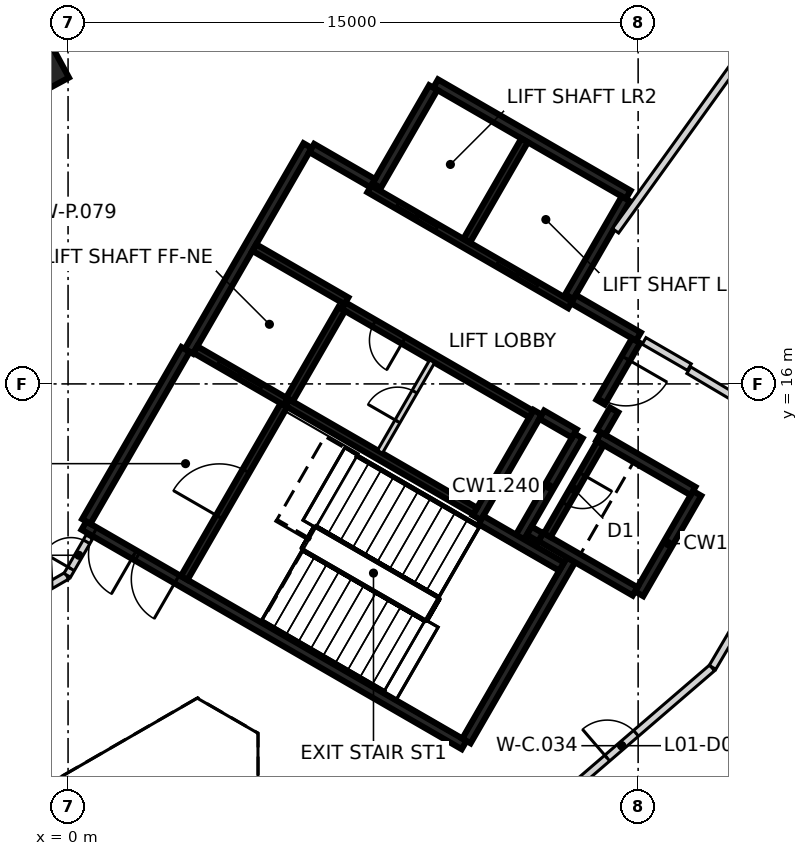
"""IFC4 building model, lengths in metres.
Left out: names, types, materials, properties, quantities, classifications, styles, units other than length and angle.
Written with IfcOpenShell. Run it as: python <this file> out.ifc"""

import sys

from ifc_helpers import new_model, si_unit, direction, frame, frame_2d, origin, origin_2d, place, context, subcontext, project, spatial, rectangle, extrude, element, fill, save


model = new_model("IFC4")
c1 = context("Model", 3, precision=1e-05, world=origin(), true_north=direction((0.0, 1.0)))
c2 = subcontext(c1, "Body", "Model", "MODEL_VIEW")
j1 = project(units=[si_unit("LENGTHUNIT", "METRE"), si_unit("PLANEANGLEUNIT", "RADIAN")], contexts=[c1])
p1 = place(None, origin())
s1 = spatial("IfcSite", under=j1, at=p1, CompositionType="ELEMENT")
p2 = place(p1, origin())
s2 = spatial("IfcBuilding", under=s1, at=p2, CompositionType="ELEMENT")
p3 = place(p2, frame((0.0, 0.0, 7.5)))
s3 = spatial("IfcBuildingStorey", under=s2, at=p3, CompositionType="ELEMENT", Elevation=7.5)
p4 = place(p3, frame((-1.197, 24.423, -0.4), z_axis=(0.0, 0.0, 1.0), x_axis=(-0.476198301069, 0.879337920289, 0.0)))
e1 = element("IfcColumn", 1, at=p4, inside=s3, PredefinedType="COLUMN", context=c2, shape_type="SweptSolid", body=[
    extrude(rectangle(XDim=1.8, YDim=1.8, at=origin_2d()), origin(), (0.0, 0.0, 1.0), 4.15),
])
p5 = place(p3, frame((10.42, 6.498, 0.0), z_axis=(0.0, 0.0, 1.0), x_axis=(-0.866021906294, 0.500006057782, 0.0)))
e2 = element("IfcWall", 2, at=p5, inside=s3, PredefinedType="SHEAR", context=c2, shape_type="SweptSolid", body=[
    extrude(rectangle(XDim=11.55, YDim=0.25, at=frame_2d((5.775, 0.0))), origin(), (0.0, 0.0, 1.0), 6.15),
])
p6 = place(p5, frame((10.025, 0.0, 0.0)))
e3 = element("IfcOpeningElement", 3, at=p6, cuts=e2, PredefinedType="OPENING", context=c2, shape_type="SweptSolid", body=[
    extrude(rectangle(XDim=1.2, YDim=2.1, at=frame_2d((0.6, 1.05))), frame((0.0, 0.135, 0.0), z_axis=(0.0, -1.0, 0.0), x_axis=(1.0, 0.0, 0.0)), (0.0, 0.0, 1.0), 0.27),
])
p7 = place(p5, frame((8.725, 0.0, 0.0)))
e4 = element("IfcOpeningElement", 4, at=p7, cuts=e2, PredefinedType="OPENING", context=c2, shape_type="SweptSolid", body=[
    extrude(rectangle(XDim=1.2, YDim=2.1, at=frame_2d((0.6, 1.05))), frame((0.0, 0.135, 0.0), z_axis=(0.0, -1.0, 0.0), x_axis=(1.0, 0.0, 0.0)), (0.0, 0.0, 1.0), 0.27),
])
p8 = place(p3, frame((3.179, 16.856, 0.0), z_axis=(0.0, 0.0, 1.0), x_axis=(0.500004234368, 0.866022959057, 0.0)))
e5 = element("IfcWall", 5, at=p8, inside=s3, PredefinedType="SHEAR", context=c2, shape_type="SweptSolid", body=[
    extrude(rectangle(XDim=6.25, YDim=0.25, at=frame_2d((3.125, 0.0))), origin(), (0.0, 0.0, 1.0), 6.15),
])
p9 = place(p3, frame((9.673, 23.903, 0.0), z_axis=(0.0, 0.0, 1.0), x_axis=(0.86603616409, -0.499981362141, 0.0)))
e6 = element("IfcWall", 6, at=p9, inside=s3, PredefinedType="SHEAR", context=c2, shape_type="SweptSolid", body=[
    extrude(rectangle(XDim=5.85, YDim=0.25, at=frame_2d((2.925, 0.0))), origin(), (0.0, 0.0, 1.0), 6.15),
])
p10 = place(p3, frame((0.48, 12.381, 0.0), z_axis=(0.0, 0.0, 1.0), x_axis=(0.49999885962, 0.866026062182, 0.0)))
e7 = element("IfcWall", 7, at=p10, inside=s3, PredefinedType="SHEAR", context=c2, shape_type="SweptSolid", body=[
    extrude(rectangle(XDim=5.225, YDim=0.25, at=frame_2d((2.612, 0.0))), origin(), (0.0, 0.0, 1.0), 6.15),
])
p11 = place(p3, frame((13.238, 11.378, 0.0), z_axis=(0.0, 0.0, 1.0), x_axis=(-0.500008851346, -0.866020293397, 0.0)))
e8 = element("IfcWall", 8, at=p11, inside=s3, PredefinedType="SHEAR", context=c2, shape_type="SweptSolid", body=[
    extrude(rectangle(XDim=5.51, YDim=0.25, at=frame_2d((2.755, 0.0))), origin(), (0.0, 0.0, 1.0), 6.15),
])
p12 = place(p3, frame((12.357, 15.252, 0.0), z_axis=(0.0, 0.0, 1.0), x_axis=(-0.500028443584, -0.866008981251, 0.0)))
e9 = element("IfcWall", 9, at=p12, inside=s3, PredefinedType="SHEAR", context=c2, shape_type="SweptSolid", body=[
    extrude(rectangle(XDim=3.2, YDim=0.25, at=frame_2d((1.6, 0.0))), origin(), (0.0, 0.0, 1.0), 6.15),
])
for number, where, z_axis, x_axis in (
    (10, (8.123, 21.219, 0.0), (0.0, 0.0, 1.0), (0.5, 0.866, 0.0)),
    (11, (14.676, 20.87, 0.0), (0.0, 0.0, 1.0), (-0.5, -0.866, 0.0)),
):
    element("IfcWall", number, at=place(p3, frame(where, z_axis=z_axis, x_axis=x_axis)), inside=s3, PredefinedType="SHEAR", context=c2, shape_type="SweptSolid", body=[
        extrude(rectangle(XDim=2.975, YDim=0.25, at=frame_2d((1.487, 0.0))), origin(), (0.0, 0.0, 1.0), 6.15),
    ])
p13 = place(p3, frame((16.552, 13.119, 0.0), z_axis=(0.0, 0.0, 1.0), x_axis=(-0.499978833458, -0.866037623948, 0.0)))
e12 = element("IfcWall", 12, at=p13, inside=s3, PredefinedType="SHEAR", context=c2, shape_type="SweptSolid", body=[
    extrude(rectangle(XDim=3.05, YDim=0.25, at=frame_2d((1.525, 0.0))), origin(), (0.0, 0.0, 1.0), 6.15),
])
p14 = place(p3, frame((14.918, 10.54, 0.0), z_axis=(0.0, 0.0, 1.0), x_axis=(-0.866063538972, 0.499933942099, 0.0)))
e13 = element("IfcWall", 13, at=p14, inside=s3, PredefinedType="SHEAR", context=c2, shape_type="SweptSolid", body=[
    extrude(rectangle(XDim=2.865, YDim=0.25, at=frame_2d((1.432, 0.0))), origin(), (0.0, 0.0, 1.0), 6.15),
])
p15 = place(p3, frame((13.963, 14.614, 0.0), z_axis=(0.0, 0.0, 1.0), x_axis=(0.866042235819, -0.499970844928, 0.0)))
e14 = element("IfcWall", 14, at=p15, inside=s3, PredefinedType="SHEAR", context=c2, shape_type="SweptSolid", body=[
    extrude(rectangle(XDim=2.865, YDim=0.25, at=frame_2d((1.432, 0.0))), origin(), (0.0, 0.0, 1.0), 6.15),
])
p16 = place(p3, frame((11.888, 11.961, 0.0), z_axis=(0.0, 0.0, 1.0), x_axis=(0.500003324108, 0.866023484601, 0.0)))
e15 = element("IfcWall", 15, at=p16, inside=s3, PredefinedType="SHEAR", context=c2, shape_type="SweptSolid", body=[
    extrude(rectangle(XDim=3.085, YDim=0.25, at=frame_2d((1.542, 0.0))), origin(), (0.0, 0.0, 1.0), 6.15),
])
p17 = place(p3, frame((10.865, 12.418, 0.0), z_axis=(0.0, 0.0, 1.0), x_axis=(0.866026229868, -0.499998569178, 0.0)))
e16 = element("IfcWall", 16, at=p17, inside=s3, PredefinedType="SHEAR", context=c2, shape_type="SweptSolid", body=[
    extrude(rectangle(XDim=2.449, YDim=0.25, at=frame_2d((1.225, 0.0))), origin(), (0.0, 0.0, 1.0), 6.15),
])
p18 = place(p3, frame((13.297, 18.231, 0.0), z_axis=(0.0, 0.0, 1.0), x_axis=(0.866043531843, -0.499968599967, 0.0)))
e17 = element("IfcWall", 17, at=p18, inside=s3, PredefinedType="SHEAR", context=c2, shape_type="SweptSolid", body=[
    extrude(rectangle(XDim=1.975, YDim=0.25, at=frame_2d((0.987, 0.0))), origin(), (0.0, 0.0, 1.0), 6.15),
])
p19 = place(p3, frame((6.413, 22.206, 0.0), z_axis=(0.0, 0.0, 1.0), x_axis=(0.866016279763, -0.500015802937, 0.0)))
e18 = element("IfcWall", 18, at=p19, inside=s3, PredefinedType="SHEAR", context=c2, shape_type="SweptSolid", body=[
    extrude(rectangle(XDim=1.849, YDim=0.25, at=frame_2d((0.925, 0.0))), origin(), (0.0, 0.0, 1.0), 6.15),
])
p20 = place(p3, frame((14.945, 17.135, 0.0), z_axis=(0.0, 0.0, 1.0), x_axis=(-0.499983108224, -0.866035156036, 0.0)))
e19 = element("IfcWall", 19, at=p20, inside=s3, PredefinedType="SHEAR", context=c2, shape_type="SweptSolid", body=[
    extrude(rectangle(XDim=1.865, YDim=0.25, at=frame_2d((0.932, 0.0))), origin(), (0.0, 0.0, 1.0), 6.15),
])
p21 = place(p20, frame((0.535, 0.0, 0.0)))
e20 = element("IfcOpeningElement", 20, at=p21, cuts=e19, PredefinedType="OPENING", context=c2, shape_type="SweptSolid", body=[
    extrude(rectangle(XDim=1.25, YDim=2.1, at=frame_2d((0.625, 1.05))), frame((0.0, 0.135, 0.0), z_axis=(0.0, -1.0, 0.0), x_axis=(1.0, 0.0, 0.0)), (0.0, 0.0, 1.0), 0.27),
])
p22 = place(p3, frame((13.322, 14.695, 0.0), z_axis=(0.0, 0.0, 1.0), x_axis=(-0.866017078145, 0.500014420154, 0.0)))
e21 = element("IfcWall", 21, at=p22, inside=s3, PredefinedType="SHEAR", context=c2, shape_type="SweptSolid", body=[
    extrude(rectangle(XDim=0.989, YDim=0.25, at=frame_2d((0.495, 0.0))), origin(), (0.0, 0.0, 1.0), 6.15),
])
p23 = place(p3, frame((14.368, 15.315, 0.0), z_axis=(0.0, 0.0, 1.0), x_axis=(-0.499897359611, -0.866084655132, 0.0)))
e22 = element("IfcWall", 22, at=p23, inside=s3, PredefinedType="SHEAR", context=c2, shape_type="SweptSolid", body=[
    extrude(rectangle(XDim=0.685, YDim=0.25, at=frame_2d((0.342, 0.0))), origin(), (0.0, 0.0, 1.0), 6.15),
])
p24 = place(p3, frame((12.433, 11.964, 0.0), z_axis=(0.0, 0.0, 1.0), x_axis=(-0.866055875208, 0.499947218231, 0.0)))
e23 = element("IfcWall", 23, at=p24, inside=s3, PredefinedType="SHEAR", context=c2, shape_type="SweptSolid", body=[
    extrude(rectangle(XDim=0.345, YDim=0.25, at=frame_2d((0.172, 0.0))), origin(), (0.0, 0.0, 1.0), 6.15),
])
p25 = place(p3, frame((13.21, 18.08, 0.0), z_axis=(0.0, 0.0, 1.0), x_axis=(-0.866030299012, 0.499991521122, 0.0)))
e24 = element("IfcWall", 24, at=p25, inside=s3, PredefinedType="SHEAR", context=c2, shape_type="SweptSolid", body=[
    extrude(rectangle(XDim=6.1, YDim=0.2, at=frame_2d((3.05, 0.0))), origin(), (0.0, 0.0, 1.0), 6.15),
])
p26 = place(p25, frame((1.0, 0.0, 0.0)))
e25 = element("IfcOpeningElement", 25, at=p26, cuts=e24, PredefinedType="OPENING", context=c2, shape_type="SweptSolid", body=[
    extrude(rectangle(XDim=1.2, YDim=2.1, at=frame_2d((0.6, 1.05))), frame((0.0, 0.11, 0.0), z_axis=(0.0, -1.0, 0.0), x_axis=(1.0, 0.0, 0.0)), (0.0, 0.0, 1.0), 0.22),
])
p27 = place(p25, frame((4.05, 0.0, 0.0)))
e26 = element("IfcOpeningElement", 26, at=p27, cuts=e24, PredefinedType="OPENING", context=c2, shape_type="SweptSolid", body=[
    extrude(rectangle(XDim=1.2, YDim=2.1, at=frame_2d((0.6, 1.05))), frame((0.0, 0.11, 0.0), z_axis=(0.0, -1.0, 0.0), x_axis=(1.0, 0.0, 0.0)), (0.0, 0.0, 1.0), 0.22),
])
p28 = place(p3, frame((5.775, 15.502, 0.0), z_axis=(0.0, 0.0, 1.0), x_axis=(0.866020080793, -0.500009219579, 0.0)))
e27 = element("IfcWall", 27, at=p28, inside=s3, PredefinedType="SHEAR", context=c2, shape_type="SweptSolid", body=[
    extrude(rectangle(XDim=5.699, YDim=0.2, at=frame_2d((2.85, 0.0))), origin(), (0.0, 0.0, 1.0), 6.15),
])
p29 = place(p3, frame((12.185, 15.207, 0.0), z_axis=(0.0, 0.0, 1.0), x_axis=(-0.866020080793, 0.500009219579, 0.0)))
e28 = element("IfcWall", 28, at=p29, inside=s3, PredefinedType="SHEAR", context=c2, shape_type="SweptSolid", body=[
    extrude(rectangle(XDim=5.699, YDim=0.2, at=frame_2d((2.85, 0.0))), origin(), (0.0, 0.0, 1.0), 6.15),
])
p30 = place(p29, frame((3.874, 0.0, 0.0)))
e29 = element("IfcOpeningElement", 29, at=p30, cuts=e28, PredefinedType="OPENING", context=c2, shape_type="SweptSolid", body=[
    extrude(rectangle(XDim=0.9, YDim=2.1, at=frame_2d((0.45, 1.05))), frame((0.0, 0.11, 0.0), z_axis=(0.0, -1.0, 0.0), x_axis=(1.0, 0.0, 0.0)), (0.0, 0.0, 1.0), 0.22),
])
p31 = place(p3, frame((3.057, 10.895, 0.0), z_axis=(0.0, 0.0, 1.0), x_axis=(0.499989418164, 0.866031513124, 0.0)))
e30 = element("IfcWall", 30, at=p31, inside=s3, PredefinedType="SHEAR", context=c2, shape_type="SweptSolid", body=[
    extrude(rectangle(XDim=5.251, YDim=0.2, at=frame_2d((2.625, 0.0))), origin(), (0.0, 0.0, 1.0), 6.15),
])
p32 = place(p31, frame((1.849, 0.0, 0.0)))
e31 = element("IfcOpeningElement", 31, at=p32, cuts=e30, PredefinedType="OPENING", context=c2, shape_type="SweptSolid", body=[
    extrude(rectangle(XDim=1.4, YDim=2.1, at=frame_2d((0.7, 1.05))), frame((0.0, 0.11, 0.0), z_axis=(0.0, -1.0, 0.0), x_axis=(1.0, 0.0, 0.0)), (0.0, 0.0, 1.0), 0.22),
])
p33 = place(p3, frame((10.489, 19.767, 0.0), z_axis=(0.0, 0.0, 1.0), x_axis=(0.499946628782, 0.866056215479, 0.0)))
e32 = element("IfcWall", 32, at=p33, inside=s3, PredefinedType="SHEAR", context=c2, shape_type="SweptSolid", body=[
    extrude(rectangle(XDim=3.048, YDim=0.2, at=frame_2d((1.524, 0.0))), origin(), (0.0, 0.0, 1.0), 6.15),
])
p34 = place(p3, frame((14.008, 14.442, 0.0), z_axis=(0.0, 0.0, 1.0), x_axis=(-0.499986818241, -0.866033014143, 0.0)))
e33 = element("IfcWall", 33, at=p34, inside=s3, PredefinedType="SHEAR", context=c2, shape_type="SweptSolid", body=[
    extrude(rectangle(XDim=2.798, YDim=0.2, at=frame_2d((1.399, 0.0))), origin(), (0.0, 0.0, 1.0), 6.15),
])
p35 = place(p34, frame((0.949, 0.0, 0.0)))
e34 = element("IfcOpeningElement", 34, at=p35, cuts=e33, PredefinedType="OPENING", context=c2, shape_type="SweptSolid", body=[
    extrude(rectangle(XDim=0.9, YDim=2.1, at=frame_2d((0.45, 1.05))), frame((0.0, 0.11, 0.0), z_axis=(0.0, -1.0, 0.0), x_axis=(1.0, 0.0, 0.0)), (0.0, 0.0, 1.0), 0.22),
])
p36 = place(p3, frame((7.199, 17.97, 0.0), z_axis=(0.0, 0.0, 1.0), x_axis=(-0.499968400327, -0.866043647095, 0.0)))
e35 = element("IfcWall", 35, at=p36, inside=s3, PredefinedType="SHEAR", context=c2, shape_type="SweptSolid", body=[
    extrude(rectangle(XDim=2.75, YDim=0.2, at=frame_2d((1.375, 0.0))), origin(), (0.0, 0.0, 1.0), 6.15),
])
p37 = place(p3, frame((5.725, 15.531, 0.0), z_axis=(0.0, 0.0, 1.0), x_axis=(-0.866037306777, 0.499979382845, 0.0)))
e36 = element("IfcWall", 36, at=p37, inside=s3, PredefinedType="SHEAR", context=c2, shape_type="SweptSolid", body=[
    extrude(rectangle(XDim=2.742, YDim=0.2, at=frame_2d((1.371, 0.0))), origin(), (0.0, 0.0, 1.0), 6.15),
])
p38 = place(p37, frame((0.743, 0.0, 0.0)))
e37 = element("IfcOpeningElement", 37, at=p38, cuts=e36, PredefinedType="OPENING", context=c2, shape_type="SweptSolid", body=[
    extrude(rectangle(XDim=1.3, YDim=2.1, at=frame_2d((0.65, 1.05))), frame((0.0, 0.11, 0.0), z_axis=(0.0, -1.0, 0.0), x_axis=(1.0, 0.0, 0.0)), (0.0, 0.0, 1.0), 0.22),
])
p39 = place(p3, frame((4.901, 19.586, 0.0), z_axis=(0.0, 0.0, 1.0), x_axis=(0.866022890907, -0.500004352405, 0.0)))
e38 = element("IfcWall", 38, at=p39, inside=s3, PredefinedType="SHEAR", context=c2, shape_type="SweptSolid", body=[
    extrude(rectangle(XDim=2.799, YDim=0.2, at=frame_2d((1.399, 0.0))), origin(), (0.0, 0.0, 1.0), 6.15),
])
p40 = place(p3, frame((8.207, 14.214, 0.0), z_axis=(0.0, 0.0, 1.0), x_axis=(0.499922376475, 0.866070215109, 0.0)))
e39 = element("IfcWall", 39, at=p40, inside=s3, PredefinedType="PARTITIONING", context=c2, shape_type="SweptSolid", body=[
    extrude(rectangle(XDim=2.749, YDim=0.15, at=frame_2d((1.374, 0.0))), origin(), (0.0, 0.0, 1.0), 6.15),
])
p41 = place(p40, frame((0.924, 0.0, 0.0)))
e40 = element("IfcOpeningElement", 40, at=p41, cuts=e39, PredefinedType="OPENING", context=c2, shape_type="SweptSolid", body=[
    extrude(rectangle(XDim=0.9, YDim=2.1, at=frame_2d((0.45, 1.05))), frame((0.0, 0.085, 0.0), z_axis=(0.0, -1.0, 0.0), x_axis=(1.0, 0.0, 0.0)), (0.0, 0.0, 1.0), 0.17),
])
p42 = place(p3, frame((-8.029, 6.337, 0.0), z_axis=(0.0, 0.0, 1.0), x_axis=(0.866104553896, 0.499862882919, 0.0)))
e41 = element("IfcWall", 41, at=p42, inside=s3, PredefinedType="PARTITIONING", context=c2, shape_type="SweptSolid", body=[
    extrude(rectangle(XDim=9.23, YDim=0.2, at=frame_2d((4.615, 0.0))), origin(), (0.0, 0.0, 1.0), 6.15),
])
p43 = place(p42, frame((3.839, 0.0, 0.0)))
e42 = element("IfcOpeningElement", 42, at=p43, cuts=e41, PredefinedType="OPENING", context=c2, shape_type="SweptSolid", body=[
    extrude(rectangle(XDim=1.0, YDim=2.1, at=frame_2d((0.5, 1.05))), frame((0.0, 0.11, 0.0), z_axis=(0.0, -1.0, 0.0), x_axis=(1.0, 0.0, 0.0)), (0.0, 0.0, 1.0), 0.22),
])
p44 = place(p3, frame((-0.022, 10.963, 0.0), z_axis=(0.0, 0.0, 1.0), x_axis=(0.499306595062, 0.866425371355, 0.0)))
e43 = element("IfcWall", 43, at=p44, inside=s3, PredefinedType="PARTITIONING", context=c2, shape_type="SweptSolid", body=[
    extrude(rectangle(XDim=1.169, YDim=0.2, at=frame_2d((0.584, 0.0))), origin(), (0.0, 0.0, 1.0), 6.15),
])
p45 = place(p44, frame((0.2, 0.0, 0.0)))
e44 = element("IfcOpeningElement", 44, at=p45, cuts=e43, PredefinedType="OPENING", context=c2, shape_type="SweptSolid", body=[
    extrude(rectangle(XDim=0.82, YDim=2.1, at=frame_2d((0.41, 1.05))), frame((0.0, 0.11, 0.0), z_axis=(0.0, -1.0, 0.0), x_axis=(1.0, 0.0, 0.0)), (0.0, 0.0, 1.0), 0.22),
])
p46 = place(p3, frame((12.187, 4.433, 0.0), z_axis=(0.0, 0.0, 1.0), x_axis=(0.757945584444, 0.652317783769, 0.0)))
e45 = element("IfcWall", 45, at=p46, inside=s3, PredefinedType="PARTITIONING", context=c2, shape_type="SweptSolid", body=[
    extrude(rectangle(XDim=6.278, YDim=0.2, at=frame_2d((3.139, 0.0))), origin(), (0.0, 0.0, 1.0), 6.15),
])
p47 = place(p46, frame((2.639, 0.0, 0.0)))
e46 = element("IfcOpeningElement", 46, at=p47, cuts=e45, PredefinedType="OPENING", context=c2, shape_type="SweptSolid", body=[
    extrude(rectangle(XDim=1.0, YDim=2.1, at=frame_2d((0.5, 1.05))), frame((0.0, 0.11, 0.0), z_axis=(0.0, -1.0, 0.0), x_axis=(1.0, 0.0, 0.0)), (0.0, 0.0, 1.0), 0.22),
])
p48 = place(p3, frame((15.156, 17.131, 0.0), z_axis=(0.0, 0.0, 1.0), x_axis=(0.865567897455, -0.500791588284, 0.0)))
e47 = element("IfcWall", 47, at=p48, inside=s3, PredefinedType="PARTITIONING", context=c2, shape_type="SweptSolid", body=[
    extrude(rectangle(XDim=1.377, YDim=0.2, at=frame_2d((0.688, 0.0))), origin(), (0.0, 0.0, 1.0), 6.15),
])
p49 = place(p3, frame((16.333, 16.361, 0.0), z_axis=(0.0, 0.0, 1.0), x_axis=(0.859621281652, -0.510931748995, 0.0)))
e48 = element("IfcWall", 48, at=p49, inside=s3, PredefinedType="PARTITIONING", context=c2, shape_type="SweptSolid", body=[
    extrude(rectangle(XDim=2.511, YDim=0.2, at=frame_2d((1.256, 0.0))), origin(), (0.0, 0.0, 1.0), 6.15),
])
p50 = place(p3, frame((16.957, 8.542, 0.0), z_axis=(0.0, 0.0, 1.0), x_axis=(0.506952960322, 0.861973721189, 0.0)))
e49 = element("IfcWall", 49, at=p50, inside=s3, PredefinedType="PARTITIONING", context=c2, shape_type="SweptSolid", body=[
    extrude(rectangle(XDim=4.448, YDim=0.2, at=frame_2d((2.224, 0.0))), origin(), (0.0, 0.0, 1.0), 6.15),
])
p51 = place(p3, frame((14.405, 20.029, 0.0), z_axis=(0.0, 0.0, 1.0), x_axis=(0.583802556312, 0.811895667709, 0.0)))
e50 = element("IfcWall", 50, at=p51, inside=s3, PredefinedType="PARTITIONING", context=c2, shape_type="SweptSolid", body=[
    extrude(rectangle(XDim=19.395, YDim=0.2, at=frame_2d((9.697, 0.0))), origin(), (0.0, 0.0, 1.0), 3.75),
])
p52 = place(p38, origin())
e51 = element("IfcDoor", 51, at=p52, inside=s3, OperationType="SLIDING_TO_RIGHT", PredefinedType="DOOR", context=c2, shape_type="SweptSolid", body=[
    extrude(rectangle(XDim=1.3, YDim=2.1, at=frame_2d((0.65, 1.05))), frame((0.0, 0.025, 0.0), z_axis=(0.0, -1.0, 0.0), x_axis=(1.0, 0.0, 0.0)), (0.0, 0.0, 1.0), 0.05),
])
fill(e37, e51)
p53 = place(p26, origin())
e52 = element("IfcDoor", 52, at=p53, inside=s3, OperationType="DOUBLE_DOOR_SLIDING", PredefinedType="DOOR", context=c2, shape_type="SweptSolid", body=[
    extrude(rectangle(XDim=1.2, YDim=2.1, at=frame_2d((0.6, 1.05))), frame((0.0, 0.025, 0.0), z_axis=(0.0, -1.0, 0.0), x_axis=(1.0, 0.0, 0.0)), (0.0, 0.0, 1.0), 0.05),
])
fill(e25, e52)
p54 = place(p27, origin())
e53 = element("IfcDoor", 53, at=p54, inside=s3, OperationType="DOUBLE_DOOR_SLIDING", PredefinedType="DOOR", context=c2, shape_type="SweptSolid", body=[
    extrude(rectangle(XDim=1.2, YDim=2.1, at=frame_2d((0.6, 1.05))), frame((0.0, 0.025, 0.0), z_axis=(0.0, -1.0, 0.0), x_axis=(1.0, 0.0, 0.0)), (0.0, 0.0, 1.0), 0.05),
])
fill(e26, e53)
p55 = place(p21, origin())
e54 = element("IfcDoor", 54, at=p55, inside=s3, OperationType="SINGLE_SWING_LEFT", PredefinedType="DOOR", context=c2, shape_type="SweptSolid", body=[
    extrude(rectangle(XDim=1.25, YDim=2.1, at=frame_2d((0.625, 1.05))), frame((0.0, 0.025, 0.0), z_axis=(0.0, -1.0, 0.0), x_axis=(1.0, 0.0, 0.0)), (0.0, 0.0, 1.0), 0.05),
])
fill(e20, e54)
p56 = place(p6, origin())
e55 = element("IfcDoor", 55, at=p56, inside=s3, OperationType="SINGLE_SWING_LEFT", PredefinedType="DOOR", context=c2, shape_type="SweptSolid", body=[
    extrude(rectangle(XDim=1.2, YDim=2.1, at=frame_2d((0.6, 1.05))), frame((0.0, 0.025, 0.0), z_axis=(0.0, -1.0, 0.0), x_axis=(1.0, 0.0, 0.0)), (0.0, 0.0, 1.0), 0.05),
])
fill(e3, e55)
p57 = place(p7, origin())
e56 = element("IfcDoor", 56, at=p57, inside=s3, OperationType="SINGLE_SWING_RIGHT", PredefinedType="DOOR", context=c2, shape_type="SweptSolid", body=[
    extrude(rectangle(XDim=1.2, YDim=2.1, at=frame_2d((0.6, 1.05))), frame((0.0, 0.025, 0.0), z_axis=(0.0, -1.0, 0.0), x_axis=(1.0, 0.0, 0.0)), (0.0, 0.0, 1.0), 0.05),
])
fill(e4, e56)
p58 = place(p32, origin())
e57 = element("IfcDoor", 57, at=p58, inside=s3, OperationType="SINGLE_SWING_RIGHT", PredefinedType="DOOR", context=c2, shape_type="SweptSolid", body=[
    extrude(rectangle(XDim=1.4, YDim=2.1, at=frame_2d((0.7, 1.05))), frame((0.0, 0.025, 0.0), z_axis=(0.0, -1.0, 0.0), x_axis=(1.0, 0.0, 0.0)), (0.0, 0.0, 1.0), 0.05),
])
fill(e31, e57)
p59 = place(p30, origin())
e58 = element("IfcDoor", 58, at=p59, inside=s3, OperationType="SINGLE_SWING_LEFT", PredefinedType="DOOR", context=c2, shape_type="SweptSolid", body=[
    extrude(rectangle(XDim=0.9, YDim=2.1, at=frame_2d((0.45, 1.05))), frame((0.0, 0.025, 0.0), z_axis=(0.0, -1.0, 0.0), x_axis=(1.0, 0.0, 0.0)), (0.0, 0.0, 1.0), 0.05),
])
fill(e29, e58)
p60 = place(p35, origin())
e59 = element("IfcDoor", 59, at=p60, inside=s3, OperationType="SINGLE_SWING_RIGHT", PredefinedType="DOOR", context=c2, shape_type="SweptSolid", body=[
    extrude(rectangle(XDim=0.9, YDim=2.1, at=frame_2d((0.45, 1.05))), frame((0.0, 0.025, 0.0), z_axis=(0.0, -1.0, 0.0), x_axis=(1.0, 0.0, 0.0)), (0.0, 0.0, 1.0), 0.05),
])
fill(e34, e59)
p61 = place(p41, origin())
e60 = element("IfcDoor", 60, at=p61, inside=s3, OperationType="SINGLE_SWING_LEFT", PredefinedType="DOOR", context=c2, shape_type="SweptSolid", body=[
    extrude(rectangle(XDim=0.9, YDim=2.1, at=frame_2d((0.45, 1.05))), frame((0.0, 0.025, 0.0), z_axis=(0.0, -1.0, 0.0), x_axis=(1.0, 0.0, 0.0)), (0.0, 0.0, 1.0), 0.05),
])
fill(e40, e60)
p62 = place(p47, origin())
e61 = element("IfcDoor", 61, at=p62, inside=s3, OperationType="SINGLE_SWING_LEFT", PredefinedType="DOOR", context=c2, shape_type="SweptSolid", body=[
    extrude(rectangle(XDim=1.0, YDim=2.1, at=frame_2d((0.5, 1.05))), frame((0.0, 0.025, 0.0), z_axis=(0.0, -1.0, 0.0), x_axis=(1.0, 0.0, 0.0)), (0.0, 0.0, 1.0), 0.05),
])
fill(e46, e61)
p63 = place(p45, origin())
e62 = element("IfcDoor", 62, at=p63, inside=s3, OperationType="SINGLE_SWING_LEFT", PredefinedType="DOOR", context=c2, shape_type="SweptSolid", body=[
    extrude(rectangle(XDim=0.82, YDim=2.1, at=frame_2d((0.41, 1.05))), frame((0.0, 0.025, 0.0), z_axis=(0.0, -1.0, 0.0), x_axis=(1.0, 0.0, 0.0)), (0.0, 0.0, 1.0), 0.05),
])
fill(e44, e62)
save(model, sys.argv[1])
